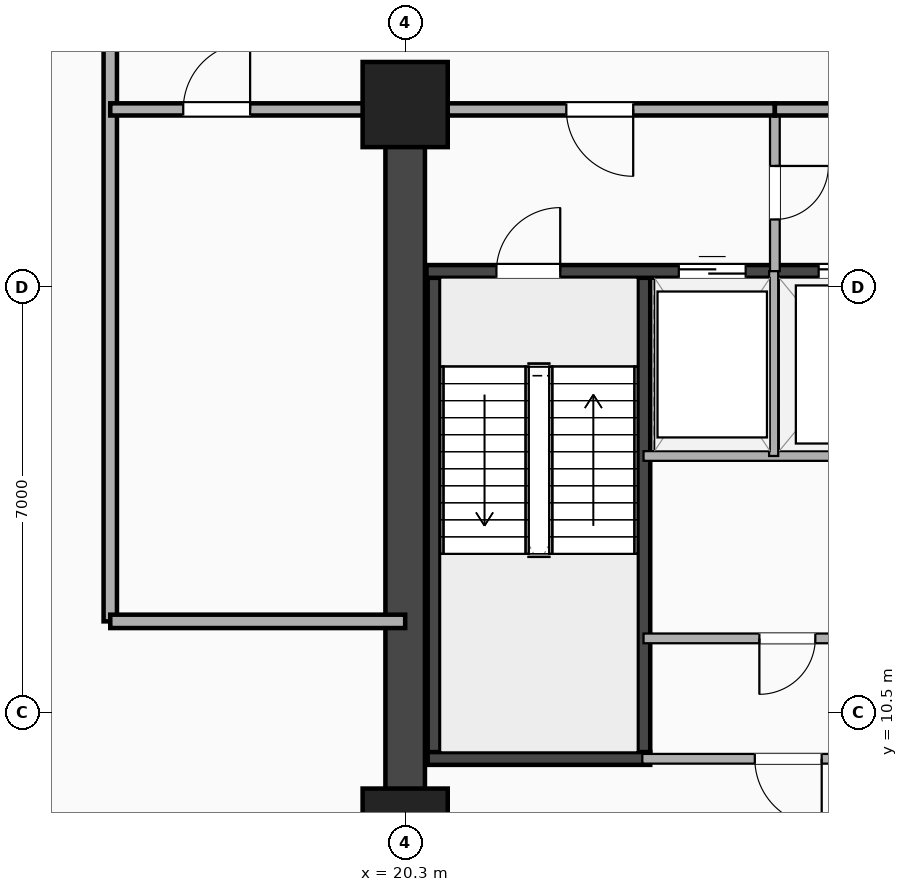
"""IFC4 building model, lengths in metres.
Left out: names, types, materials, properties, quantities, classifications, styles, units other than length and angle.
Written with IfcOpenShell. Run it as: python <this file> out.ifc"""

import sys

from ifc_helpers import new_model, si_unit, direction, frame, frame_2d, origin, origin_2d, place, context, subcontext, project, spatial, rectangle, extrude, element, fill, save


model = new_model("IFC4")
c1 = context("Model", 3, precision=1e-05, world=origin(), true_north=direction((0.0, 1.0)))
c2 = subcontext(c1, "Body", "Model", "MODEL_VIEW")
j1 = project(units=[si_unit("LENGTHUNIT", "METRE"), si_unit("PLANEANGLEUNIT", "RADIAN")], contexts=[c1])
p1 = place(None, origin())
s1 = spatial("IfcSite", under=j1, at=p1, CompositionType="ELEMENT")
p2 = place(p1, origin())
s2 = spatial("IfcBuilding", under=s1, at=p2, CompositionType="ELEMENT")
p3 = place(p2, frame((0.0, 0.0, 75.4)))
s3 = spatial("IfcBuildingStorey", under=s2, at=p3, CompositionType="ELEMENT", Elevation=75.4)
p4 = place(p3, frame((20.3, 3.5, 0.0), z_axis=(0.0, 0.0, 1.0), x_axis=(0.0, 1.0, 0.0)))
e1 = element("IfcWall", 1, at=p4, inside=s3, PredefinedType="SHEAR", context=c2, shape_type="SweptSolid", body=[
    extrude(rectangle(XDim=16.9, YDim=0.65, at=frame_2d((8.45, 0.0))), origin(), (0.0, 0.0, 1.0), 8.14),
])
for number, where, z_axis, x_axis in (
    (2, (20.775, 9.745, 0.0), (0.0, 0.0, 1.0), (0.0, 1.0, 0.0)),
    (3, (24.225, 9.745, 0.0), (0.0, 0.0, 1.0), (0.0, 1.0, 0.0)),
):
    element("IfcWall", number, at=place(p3, frame(where, z_axis=z_axis, x_axis=x_axis)), inside=s3, PredefinedType="SHEAR", context=c2, shape_type="SweptSolid", body=[
        extrude(rectangle(XDim=8.01, YDim=0.21, at=frame_2d((4.005, 0.0))), origin(), (0.0, 0.0, 1.0), 8.14),
    ])
p5 = place(p3, frame((20.67, 9.745, 0.0), z_axis=(0.0, 0.0, 1.0), x_axis=(1.0, 0.0, 0.0)))
e4 = element("IfcWall", 4, at=p5, inside=s3, PredefinedType="SHEAR", context=c2, shape_type="SweptSolid", body=[
    extrude(rectangle(XDim=3.66, YDim=0.21, at=frame_2d((1.83, 0.0))), origin(), (0.0, 0.0, 1.0), 8.14),
])
p6 = place(p3, frame((20.65, 17.755, 0.0), z_axis=(0.0, 0.0, 1.0), x_axis=(1.0, 0.0, 0.0)))
e5 = element("IfcWall", 5, at=p6, inside=s3, PredefinedType="SHEAR", context=c2, shape_type="SweptSolid", body=[
    extrude(rectangle(XDim=8.3, YDim=0.21, at=frame_2d((4.15, 0.0))), origin(), (0.0, 0.0, 1.0), 8.14),
])
p7 = place(p6, frame((2.2, 0.0, 0.0), z_axis=(0.0, 0.0, 1.0), x_axis=(-1.0, 0.0, 0.0)))
e6 = element("IfcOpeningElement", 6, at=p7, cuts=e5, PredefinedType="OPENING", context=c2, shape_type="SweptSolid", body=[
    extrude(rectangle(XDim=1.05, YDim=2.15, at=frame_2d((0.525, 1.075))), frame((0.0, 0.115, 0.0), z_axis=(0.0, -1.0, 0.0), x_axis=(1.0, 0.0, 0.0)), (0.0, 0.0, 1.0), 0.23),
])
p8 = place(p6, frame((4.15, 0.0, 0.0)))
e7 = element("IfcOpeningElement", 7, at=p8, cuts=e5, PredefinedType="OPENING", context=c2, shape_type="SweptSolid", body=[
    extrude(rectangle(XDim=1.1, YDim=2.18, at=frame_2d((0.55, 1.09))), frame((0.0, 0.115, 0.0), z_axis=(0.0, -1.0, 0.0), x_axis=(1.0, 0.0, 0.0)), (0.0, 0.0, 1.0), 0.23),
])
p9 = place(p6, frame((6.45, 0.0, 0.0)))
e8 = element("IfcOpeningElement", 8, at=p9, cuts=e5, PredefinedType="OPENING", context=c2, shape_type="SweptSolid", body=[
    extrude(rectangle(XDim=1.12, YDim=2.2, at=frame_2d((0.56, 1.1))), frame((0.0, 0.115, 0.0), z_axis=(0.0, -1.0, 0.0), x_axis=(1.0, 0.0, 0.0)), (0.0, 0.0, 1.0), 0.23),
])
for number, where, z_axis, x_axis in (
    (9, (20.3, 8.55, -0.32), (0.0, 0.0, 1.0), (1.0, 0.0, 0.0)),
    (10, (20.3, 20.5, -0.32), (0.0, 0.0, 1.0), (1.0, 0.0, 0.0)),
):
    element("IfcColumn", number, at=place(p3, frame(where, z_axis=z_axis, x_axis=x_axis)), inside=s3, PredefinedType="COLUMN", context=c2, shape_type="SweptSolid", body=[
        extrude(rectangle(XDim=1.4, YDim=1.4, at=origin_2d()), origin(), (0.0, 0.0, 1.0), 8.46),
    ])
p10 = place(p3, frame((26.38, 17.76, 0.0), z_axis=(0.0, 0.0, 1.0), x_axis=(0.0, 1.0, 0.0)))
e11 = element("IfcWall", 11, at=p10, inside=s3, PredefinedType="PARTITIONING", context=c2, shape_type="SweptSolid", body=[
    extrude(rectangle(XDim=2.66, YDim=0.16, at=frame_2d((1.33, 0.0))), origin(), (0.0, 0.0, 1.0), 7.43),
])
p11 = place(p10, frame((0.85, 0.0, 0.0)))
e12 = element("IfcOpeningElement", 12, at=p11, cuts=e11, PredefinedType="OPENING", context=c2, shape_type="SweptSolid", body=[
    extrude(rectangle(XDim=0.88, YDim=2.08, at=frame_2d((0.44, 1.04))), frame((0.0, 0.09, 0.0), z_axis=(0.0, -1.0, 0.0), x_axis=(1.0, 0.0, 0.0)), (0.0, 0.0, 1.0), 0.18),
])
p12 = place(p3, frame((24.22, 14.72, 0.0), z_axis=(0.0, 0.0, 1.0), x_axis=(1.0, 0.0, 0.0)))
e13 = element("IfcWall", 13, at=p12, inside=s3, PredefinedType="PARTITIONING", context=c2, shape_type="SweptSolid", body=[
    extrude(rectangle(XDim=4.73, YDim=0.16, at=frame_2d((2.365, 0.0))), origin(), (0.0, 0.0, 1.0), 8.14),
])
p13 = place(p3, frame((26.36, 14.72, 0.0), z_axis=(0.0, 0.0, 1.0), x_axis=(0.0, 1.0, 0.0)))
e14 = element("IfcWall", 14, at=p13, inside=s3, PredefinedType="PARTITIONING", context=c2, shape_type="SweptSolid", body=[
    extrude(rectangle(XDim=3.04, YDim=0.15, at=frame_2d((1.52, 0.0))), origin(), (0.0, 0.0, 1.0), 8.14),
])
p14 = place(p3, frame((20.65, 20.42, 0.0), z_axis=(0.0, 0.0, 1.0), x_axis=(1.0, 0.0, 0.0)))
e15 = element("IfcWall", 15, at=p14, inside=s3, PredefinedType="PARTITIONING", context=c2, shape_type="SweptSolid", body=[
    extrude(rectangle(XDim=5.73, YDim=0.2, at=frame_2d((2.865, 0.0))), origin(), (0.0, 0.0, 1.0), 7.43),
])
p15 = place(p14, frame((2.3, 0.0, 0.0)))
e16 = element("IfcOpeningElement", 16, at=p15, cuts=e15, PredefinedType="OPENING", context=c2, shape_type="SweptSolid", body=[
    extrude(rectangle(XDim=1.1, YDim=2.15, at=frame_2d((0.55, 1.075))), frame((0.0, 0.11, 0.0), z_axis=(0.0, -1.0, 0.0), x_axis=(1.0, 0.0, 0.0)), (0.0, 0.0, 1.0), 0.22),
])
p16 = place(p3, frame((26.38, 20.42, 0.0), z_axis=(0.0, 0.0, 1.0), x_axis=(1.0, 0.0, 0.0)))
e17 = element("IfcWall", 17, at=p16, inside=s3, PredefinedType="PARTITIONING", context=c2, shape_type="SweptSolid", body=[
    extrude(rectangle(XDim=2.82, YDim=0.2, at=frame_2d((1.41, 0.0))), origin(), (0.0, 0.0, 1.0), 7.43),
])
p17 = place(p3, frame((24.22, 11.72, 0.0), z_axis=(0.0, 0.0, 1.0), x_axis=(1.0, 0.0, 0.0)))
e18 = element("IfcWall", 18, at=p17, inside=s3, PredefinedType="PARTITIONING", context=c2, shape_type="SweptSolid", body=[
    extrude(rectangle(XDim=4.73, YDim=0.16, at=frame_2d((2.365, 0.0))), origin(), (0.0, 0.0, 1.0), 8.14),
])
p18 = place(p17, frame((1.905, 0.0, 0.0)))
e19 = element("IfcOpeningElement", 19, at=p18, cuts=e18, PredefinedType="OPENING", context=c2, shape_type="SweptSolid", body=[
    extrude(rectangle(XDim=0.92, YDim=2.08, at=frame_2d((0.46, 1.04))), frame((0.0, 0.09, 0.0), z_axis=(0.0, -1.0, 0.0), x_axis=(1.0, 0.0, 0.0)), (0.0, 0.0, 1.0), 0.18),
])
p19 = place(p3, frame((24.2, 9.74, 0.0), z_axis=(0.0, 0.0, 1.0), x_axis=(1.0, 0.0, 0.0)))
e20 = element("IfcWall", 20, at=p19, inside=s3, PredefinedType="PARTITIONING", context=c2, shape_type="SweptSolid", body=[
    extrude(rectangle(XDim=4.8, YDim=0.16, at=frame_2d((2.4, 0.0))), origin(), (0.0, 0.0, 1.0), 8.14),
])
p20 = place(p19, frame((1.85, 0.0, 0.0)))
e21 = element("IfcOpeningElement", 21, at=p20, cuts=e20, PredefinedType="OPENING", context=c2, shape_type="SweptSolid", body=[
    extrude(rectangle(XDim=1.1, YDim=2.15, at=frame_2d((0.55, 1.075))), frame((0.0, 0.09, 0.0), z_axis=(0.0, -1.0, 0.0), x_axis=(1.0, 0.0, 0.0)), (0.0, 0.0, 1.0), 0.18),
])
p21 = place(p3, frame((15.45, 12.0, 0.0), z_axis=(0.0, 0.0, 1.0), x_axis=(0.0, 1.0, 0.0)))
e22 = element("IfcWall", 22, at=p21, inside=s3, PredefinedType="PARTITIONING", context=c2, shape_type="SweptSolid", body=[
    extrude(rectangle(XDim=20.8, YDim=0.22, at=frame_2d((10.4, 0.0))), origin(), (0.0, 0.0, 1.0), 7.43),
])
p22 = place(p3, frame((15.45, 12.0, 0.0), z_axis=(0.0, 0.0, 1.0), x_axis=(1.0, 0.0, 0.0)))
e23 = element("IfcWall", 23, at=p22, inside=s3, PredefinedType="PARTITIONING", context=c2, shape_type="SweptSolid", body=[
    extrude(rectangle(XDim=4.85, YDim=0.22, at=frame_2d((2.425, 0.0))), origin(), (0.0, 0.0, 1.0), 7.43),
])
p23 = place(p3, frame((15.45, 20.42, 0.0), z_axis=(0.0, 0.0, 1.0), x_axis=(1.0, 0.0, 0.0)))
e24 = element("IfcWall", 24, at=p23, inside=s3, PredefinedType="PARTITIONING", context=c2, shape_type="SweptSolid", body=[
    extrude(rectangle(XDim=4.85, YDim=0.2, at=frame_2d((2.425, 0.0))), origin(), (0.0, 0.0, 1.0), 7.43),
])
p24 = place(p23, frame((2.3, 0.0, 0.0), z_axis=(0.0, 0.0, 1.0), x_axis=(-1.0, 0.0, 0.0)))
e25 = element("IfcOpeningElement", 25, at=p24, cuts=e24, PredefinedType="OPENING", context=c2, shape_type="SweptSolid", body=[
    extrude(rectangle(XDim=1.1, YDim=2.15, at=frame_2d((0.55, 1.075))), frame((0.0, 0.11, 0.0), z_axis=(0.0, -1.0, 0.0), x_axis=(1.0, 0.0, 0.0)), (0.0, 0.0, 1.0), 0.22),
])
p25 = place(p7, origin())
e26 = element("IfcDoor", 26, at=p25, inside=s3, OperationType="SINGLE_SWING_RIGHT", PredefinedType="DOOR", context=c2, shape_type="SweptSolid", body=[
    extrude(rectangle(XDim=1.05, YDim=2.15, at=frame_2d((0.525, 1.075))), frame((0.0, 0.025, 0.0), z_axis=(0.0, -1.0, 0.0), x_axis=(1.0, 0.0, 0.0)), (0.0, 0.0, 1.0), 0.05),
])
fill(e6, e26)
p26 = place(p8, origin())
e27 = element("IfcDoor", 27, at=p26, inside=s3, OperationType="DOUBLE_DOOR_SLIDING", PredefinedType="DOOR", context=c2, shape_type="SweptSolid", body=[
    extrude(rectangle(XDim=1.1, YDim=2.18, at=frame_2d((0.55, 1.09))), frame((0.0, 0.025, 0.0), z_axis=(0.0, -1.0, 0.0), x_axis=(1.0, 0.0, 0.0)), (0.0, 0.0, 1.0), 0.05),
])
fill(e7, e27)
p27 = place(p9, origin())
e28 = element("IfcDoor", 28, at=p27, inside=s3, OperationType="DOUBLE_DOOR_SLIDING", PredefinedType="DOOR", context=c2, shape_type="SweptSolid", body=[
    extrude(rectangle(XDim=1.12, YDim=2.2, at=frame_2d((0.56, 1.1))), frame((0.0, 0.025, 0.0), z_axis=(0.0, -1.0, 0.0), x_axis=(1.0, 0.0, 0.0)), (0.0, 0.0, 1.0), 0.05),
])
fill(e8, e28)
p28 = place(p11, origin())
e29 = element("IfcDoor", 29, at=p28, inside=s3, OperationType="SINGLE_SWING_RIGHT", PredefinedType="DOOR", context=c2, shape_type="SweptSolid", body=[
    extrude(rectangle(XDim=0.88, YDim=2.08, at=frame_2d((0.44, 1.04))), frame((0.0, 0.025, 0.0), z_axis=(0.0, -1.0, 0.0), x_axis=(1.0, 0.0, 0.0)), (0.0, 0.0, 1.0), 0.05),
])
fill(e12, e29)
p29 = place(p15, origin())
e30 = element("IfcDoor", 30, at=p29, inside=s3, OperationType="SINGLE_SWING_RIGHT", PredefinedType="DOOR", context=c2, shape_type="SweptSolid", body=[
    extrude(rectangle(XDim=1.1, YDim=2.15, at=frame_2d((0.55, 1.075))), frame((0.0, 0.025, 0.0), z_axis=(0.0, -1.0, 0.0), x_axis=(1.0, 0.0, 0.0)), (0.0, 0.0, 1.0), 0.05),
])
fill(e16, e30)
p30 = place(p18, origin())
e31 = element("IfcDoor", 31, at=p30, inside=s3, OperationType="SINGLE_SWING_LEFT", PredefinedType="DOOR", context=c2, shape_type="SweptSolid", body=[
    extrude(rectangle(XDim=0.92, YDim=2.08, at=frame_2d((0.46, 1.04))), frame((0.0, 0.025, 0.0), z_axis=(0.0, -1.0, 0.0), x_axis=(1.0, 0.0, 0.0)), (0.0, 0.0, 1.0), 0.05),
])
fill(e19, e31)
p31 = place(p20, origin())
e32 = element("IfcDoor", 32, at=p31, inside=s3, OperationType="SINGLE_SWING_RIGHT", PredefinedType="DOOR", context=c2, shape_type="SweptSolid", body=[
    extrude(rectangle(XDim=1.1, YDim=2.15, at=frame_2d((0.55, 1.075))), frame((0.0, 0.025, 0.0), z_axis=(0.0, -1.0, 0.0), x_axis=(1.0, 0.0, 0.0)), (0.0, 0.0, 1.0), 0.05),
])
fill(e21, e32)
p32 = place(p24, origin())
e33 = element("IfcDoor", 33, at=p32, inside=s3, OperationType="SINGLE_SWING_RIGHT", PredefinedType="DOOR", context=c2, shape_type="SweptSolid", body=[
    extrude(rectangle(XDim=1.1, YDim=2.15, at=frame_2d((0.55, 1.075))), frame((0.0, 0.025, 0.0), z_axis=(0.0, -1.0, 0.0), x_axis=(1.0, 0.0, 0.0)), (0.0, 0.0, 1.0), 0.05),
])
fill(e25, e33)
save(model, sys.argv[1])
